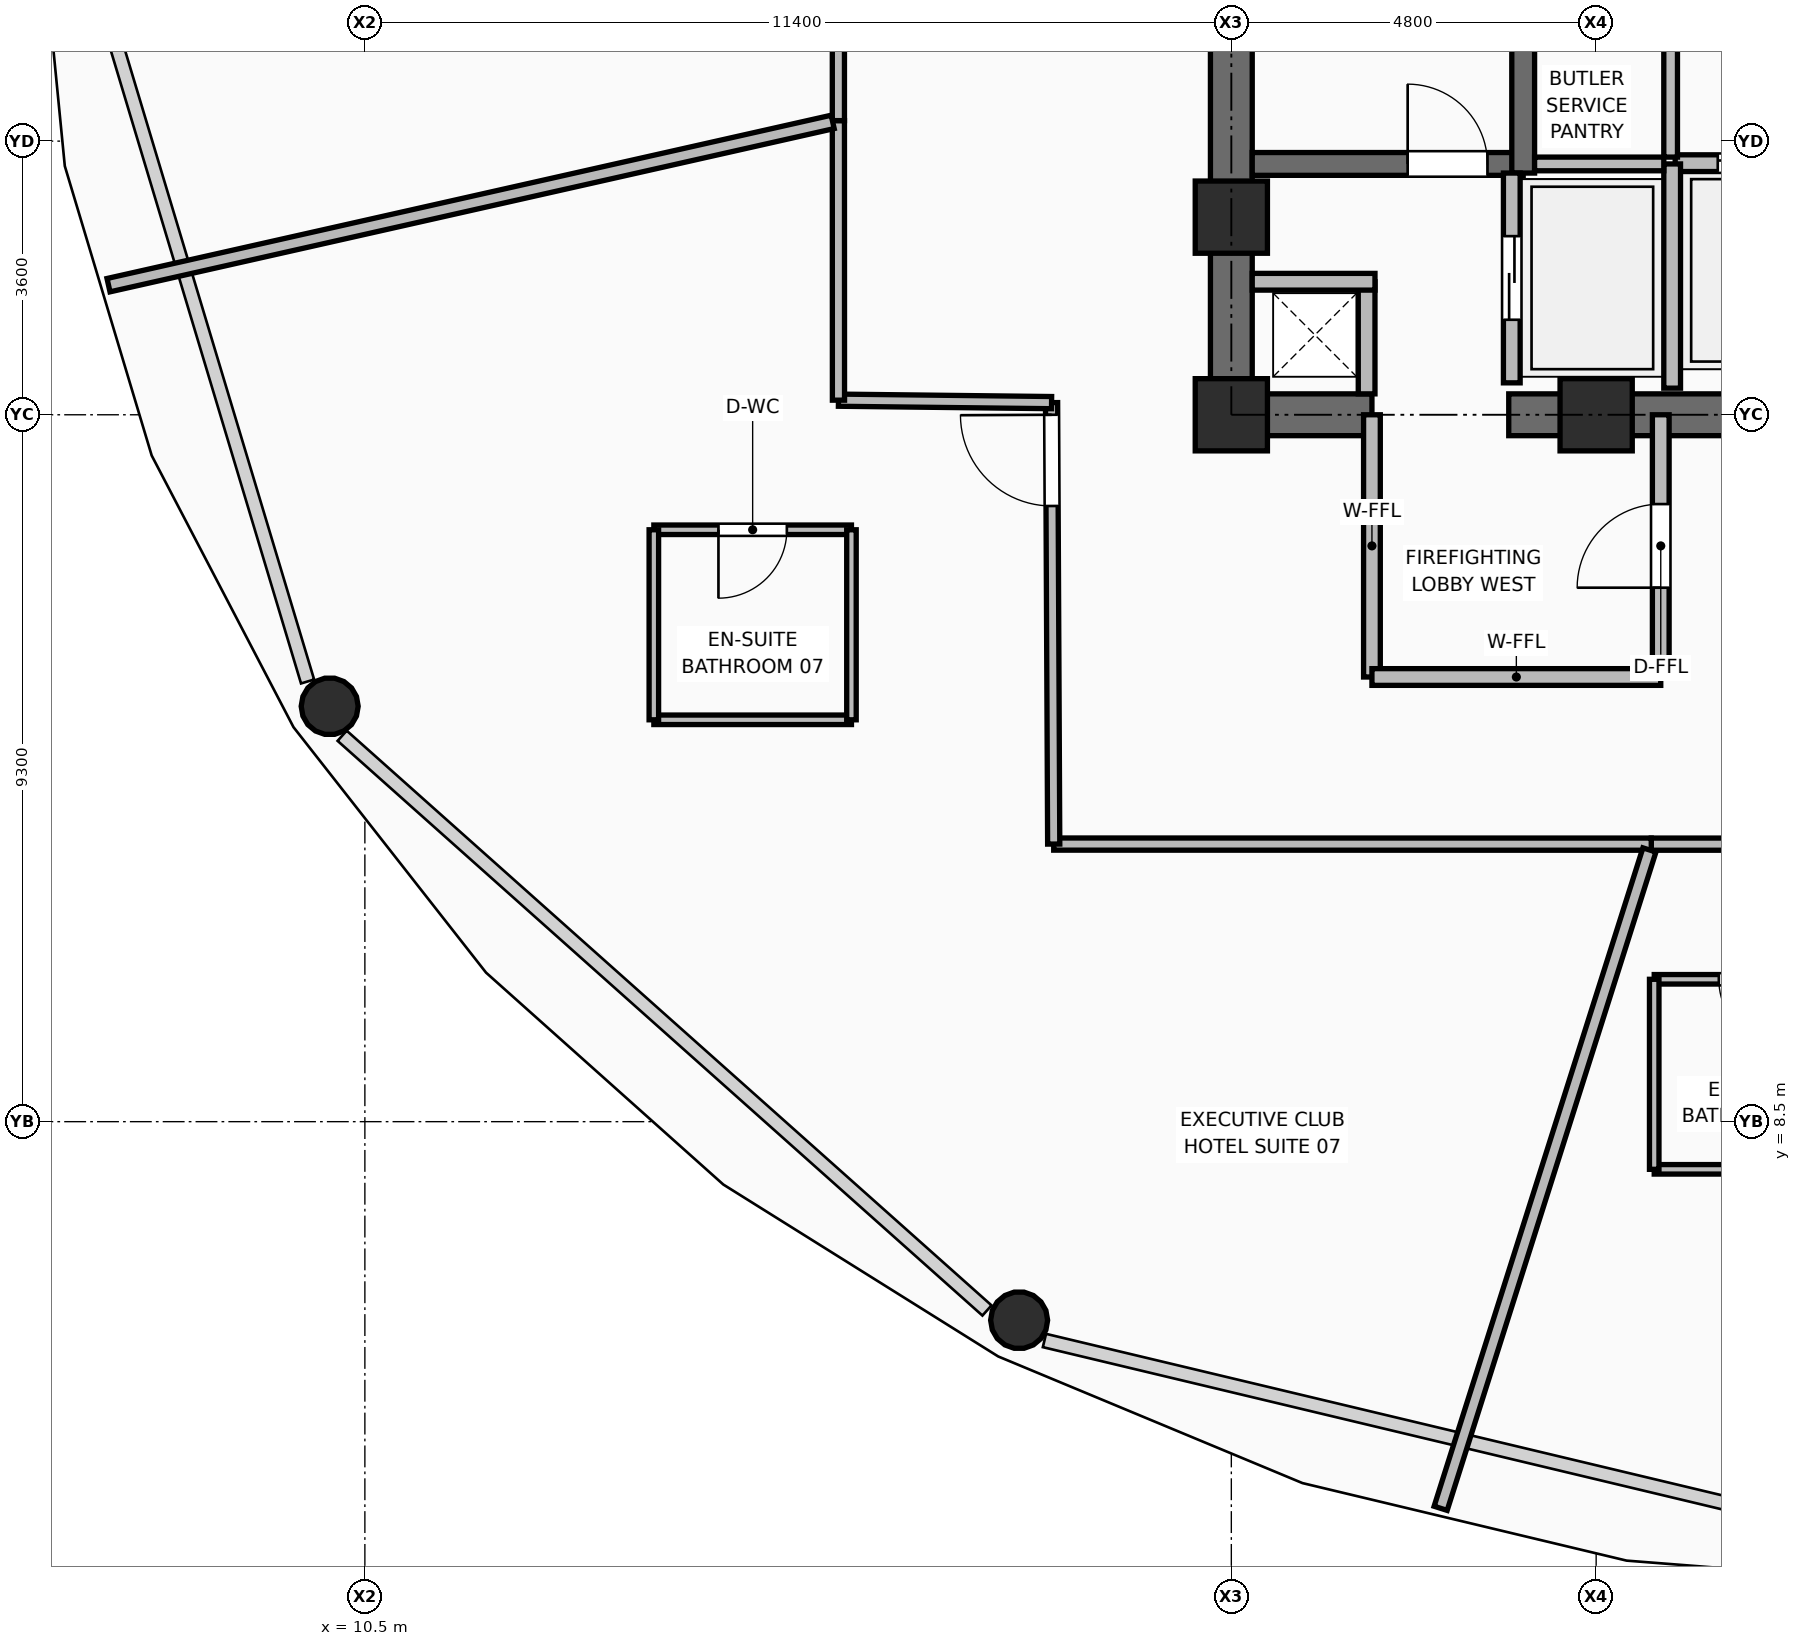
"""IFC4 building model, lengths in metres.
Left out: names, types, materials, properties, quantities, classifications, styles, units other than length and angle.
Written with IfcOpenShell. Run it as: python <this file> out.ifc"""

import sys

from ifc_helpers import new_model, si_unit, direction, frame, frame_2d, origin, origin_2d, place, context, subcontext, project, spatial, rectangle, hollow_circle, extrude, element, fill, save


model = new_model("IFC4")
c1 = context("Model", 3, precision=1e-05, world=origin(), true_north=direction((0.0, 1.0)))
c2 = subcontext(c1, "Body", "Model", "MODEL_VIEW")
j1 = project(units=[si_unit("LENGTHUNIT", "METRE"), si_unit("PLANEANGLEUNIT", "RADIAN")], contexts=[c1])
p1 = place(None, origin())
s1 = spatial("IfcSite", under=j1, at=p1, CompositionType="ELEMENT")
p2 = place(p1, origin())
s2 = spatial("IfcBuilding", under=s1, at=p2, CompositionType="ELEMENT")
p3 = place(p2, frame((0.0, 0.0, 160.95)))
s3 = spatial("IfcBuildingStorey", under=s2, at=p3, CompositionType="ELEMENT", Elevation=160.95)
for number, where, z_axis, x_axis in (
    (1, (21.9, 17.8, 0.0), (0.0, 0.0, 1.0), (1.0, 0.0, 0.0)),
    (2, (26.7, 17.8, 0.0), (0.0, 0.0, 1.0), (1.0, 0.0, 0.0)),
    (3, (21.9, 20.4, 0.0), (0.0, 0.0, 1.0), (1.0, 0.0, 0.0)),
):
    element("IfcColumn", number, at=place(p3, frame(where, z_axis=z_axis, x_axis=x_axis)), inside=s3, PredefinedType="COLUMN", context=c2, shape_type="SweptSolid", body=[
        extrude(rectangle(XDim=0.95, YDim=0.95, at=origin_2d()), origin(), (0.0, 0.0, 1.0), 3.75),
    ])
p4 = place(p3, frame((10.037, 13.965, 0.0), z_axis=(0.059769728806, 0.030976548947, 0.997731443292), x_axis=(-0.460139651685, 0.887846552591, 0.0)))
e4 = element("IfcColumn", 4, at=p4, inside=s3, PredefinedType="COLUMN", context=c2, shape_type="SweptSolid", body=[
    extrude(hollow_circle(Radius=0.375, WallThickness=0.035, at=origin_2d()), origin(), (0.0, 0.0, 1.0), 3.578),
])
p5 = place(p3, frame((19.108, 5.888, 0.0), z_axis=(0.034669243934, 0.053437043308, 0.997969200891), x_axis=(-0.838908401488, 0.544272628296, 0.0)))
e5 = element("IfcColumn", 5, at=p5, inside=s3, PredefinedType="COLUMN", context=c2, shape_type="SweptSolid", body=[
    extrude(hollow_circle(Radius=0.375, WallThickness=0.035, at=origin_2d()), origin(), (0.0, 0.0, 1.0), 3.577),
])
p6 = place(p3, frame((21.625, 17.8, 0.0), z_axis=(0.0, 0.0, 1.0), x_axis=(1.0, 0.0, 0.0)))
e6 = element("IfcWall", 6, at=p6, inside=s3, PredefinedType="SHEAR", context=c2, shape_type="SweptSolid", body=[
    extrude(rectangle(XDim=2.125, YDim=0.55, at=frame_2d((1.062, 0.0))), origin(), (0.0, 0.0, 1.0), 3.57),
])
p7 = place(p3, frame((25.55, 17.8, 0.0), z_axis=(0.0, 0.0, 1.0), x_axis=(1.0, 0.0, 0.0)))
e7 = element("IfcWall", 7, at=p7, inside=s3, PredefinedType="SHEAR", context=c2, shape_type="SweptSolid", body=[
    extrude(rectangle(XDim=6.9, YDim=0.55, at=frame_2d((3.45, 0.0))), origin(), (0.0, 0.0, 1.0), 3.57),
])
p8 = place(p3, frame((21.9, 18.075, 0.0), z_axis=(0.0, 0.0, 1.0), x_axis=(0.0, 1.0, 0.0)))
e8 = element("IfcWall", 8, at=p8, inside=s3, PredefinedType="SHEAR", context=c2, shape_type="SweptSolid", body=[
    extrude(rectangle(XDim=14.1, YDim=0.55, at=frame_2d((7.05, 0.0))), origin(), (0.0, 0.0, 1.0), 3.57),
])
p9 = place(p3, frame((22.175, 21.1, 0.0), z_axis=(0.0, 0.0, 1.0), x_axis=(1.0, 0.0, 0.0)))
e9 = element("IfcWall", 9, at=p9, inside=s3, PredefinedType="SHEAR", context=c2, shape_type="SweptSolid", body=[
    extrude(rectangle(XDim=3.565, YDim=0.3, at=frame_2d((1.782, 0.0))), origin(), (0.0, 0.0, 1.0), 3.57),
])
p10 = place(p9, frame((2.045, 0.0, 0.0)))
e10 = element("IfcOpeningElement", 10, at=p10, cuts=e9, PredefinedType="OPENING", context=c2, shape_type="SweptSolid", body=[
    extrude(rectangle(XDim=1.05, YDim=2.1, at=frame_2d((0.525, 1.05))), frame((0.0, 0.16, 0.0), z_axis=(0.0, -1.0, 0.0), x_axis=(1.0, 0.0, 0.0)), (0.0, 0.0, 1.0), 0.32),
])
p11 = place(p3, frame((25.74, 20.98, 0.0), z_axis=(0.0, 0.0, 1.0), x_axis=(0.0, 1.0, 0.0)))
e11 = element("IfcWall", 11, at=p11, inside=s3, PredefinedType="SHEAR", context=c2, shape_type="SweptSolid", body=[
    extrude(rectangle(XDim=7.99, YDim=0.3, at=frame_2d((3.995, 0.0))), origin(), (0.0, 0.0, 1.0), 3.57),
])
p12 = place(p3, frame((23.68, 18.075, 0.0), z_axis=(0.0, 0.0, 1.0), x_axis=(0.0, 1.0, 0.0)))
e12 = element("IfcWall", 12, at=p12, inside=s3, PredefinedType="PARTITIONING", context=c2, shape_type="SweptSolid", body=[
    extrude(rectangle(XDim=1.475, YDim=0.22, at=frame_2d((0.738, 0.0))), origin(), (0.0, 0.0, 1.0), 3.55),
])
p13 = place(p3, frame((22.175, 19.55, 0.0), z_axis=(0.0, 0.0, 1.0), x_axis=(1.0, 0.0, 0.0)))
e13 = element("IfcWall", 13, at=p13, inside=s3, PredefinedType="PARTITIONING", context=c2, shape_type="SweptSolid", body=[
    extrude(rectangle(XDim=1.615, YDim=0.22, at=frame_2d((0.808, 0.0))), origin(), (0.0, 0.0, 1.0), 2.595),
])
p14 = place(p3, frame((25.59, 18.22, 0.0), z_axis=(0.0, 0.0, 1.0), x_axis=(0.0, 1.0, 0.0)))
e14 = element("IfcWall", 14, at=p14, inside=s3, PredefinedType="PARTITIONING", context=c2, shape_type="SweptSolid", body=[
    extrude(rectangle(XDim=2.76, YDim=0.22, at=frame_2d((1.38, 0.0))), origin(), (0.0, 0.0, 1.0), 3.55),
])
p15 = place(p14, frame((0.83, 0.0, 0.0)))
e15 = element("IfcOpeningElement", 15, at=p15, cuts=e14, PredefinedType="OPENING", context=c2, shape_type="SweptSolid", body=[
    extrude(rectangle(XDim=1.1, YDim=2.2, at=frame_2d((0.55, 1.1))), frame((0.0, 0.12, 0.0), z_axis=(0.0, -1.0, 0.0), x_axis=(1.0, 0.0, 0.0)), (0.0, 0.0, 1.0), 0.24),
])
p16 = place(p3, frame((27.74, 21.11, 0.0), z_axis=(0.0, 0.0, 1.0), x_axis=(1.0, 0.0, 0.0)))
e16 = element("IfcWall", 16, at=p16, inside=s3, PredefinedType="PARTITIONING", context=c2, shape_type="SweptSolid", body=[
    extrude(rectangle(XDim=2.22, YDim=0.22, at=frame_2d((1.11, 0.0))), origin(), (0.0, 0.0, 1.0), 3.55),
])
p17 = place(p16, frame((0.56, 0.0, 0.0)))
e17 = element("IfcOpeningElement", 17, at=p17, cuts=e16, PredefinedType="OPENING", context=c2, shape_type="SweptSolid", body=[
    extrude(rectangle(XDim=1.1, YDim=2.2, at=frame_2d((0.55, 1.1))), frame((0.0, 0.12, 0.0), z_axis=(0.0, -1.0, 0.0), x_axis=(1.0, 0.0, 0.0)), (0.0, 0.0, 1.0), 0.24),
])
p18 = place(p3, frame((27.7, 18.15, 0.0), z_axis=(0.0, 0.0, 1.0), x_axis=(0.0, 1.0, 0.0)))
e18 = element("IfcWall", 18, at=p18, inside=s3, PredefinedType="PARTITIONING", context=c2, shape_type="SweptSolid", body=[
    extrude(rectangle(XDim=2.95, YDim=0.22, at=frame_2d((1.475, 0.0))), origin(), (0.0, 0.0, 1.0), 3.55),
])
p19 = place(p3, frame((25.89, 21.1, 0.0), z_axis=(0.0, 0.0, 1.0), x_axis=(1.0, 0.0, 0.0)))
e19 = element("IfcWall", 19, at=p19, inside=s3, PredefinedType="PARTITIONING", context=c2, shape_type="SweptSolid", body=[
    extrude(rectangle(XDim=1.7, YDim=0.18, at=frame_2d((0.85, 0.0))), origin(), (0.0, 0.0, 1.0), 3.55),
])
p20 = place(p3, frame((27.68, 21.19, 0.0), z_axis=(0.0, 0.0, 1.0), x_axis=(0.0, 1.0, 0.0)))
e20 = element("IfcWall", 20, at=p20, inside=s3, PredefinedType="PARTITIONING", context=c2, shape_type="SweptSolid", body=[
    extrude(rectangle(XDim=4.37, YDim=0.18, at=frame_2d((2.185, 0.0))), origin(), (0.0, 0.0, 1.0), 3.55),
])
p21 = place(p20, frame((1.735, 0.0, 0.0)))
e21 = element("IfcOpeningElement", 21, at=p21, cuts=e20, PredefinedType="OPENING", context=c2, shape_type="SweptSolid", body=[
    extrude(rectangle(XDim=0.9, YDim=2.1, at=frame_2d((0.45, 1.05))), frame((0.0, 0.1, 0.0), z_axis=(0.0, -1.0, 0.0), x_axis=(1.0, 0.0, 0.0)), (0.0, 0.0, 1.0), 0.2),
])
p22 = place(p3, frame((23.75, 14.35, 0.0), z_axis=(0.0, 0.0, 1.0), x_axis=(0.0, 1.0, 0.0)))
e22 = element("IfcWall", 22, at=p22, inside=s3, PredefinedType="PARTITIONING", context=c2, shape_type="SweptSolid", body=[
    extrude(rectangle(XDim=3.45, YDim=0.22, at=frame_2d((1.725, 0.0))), origin(), (0.0, 0.0, 1.0), 3.006),
])
p23 = place(p3, frame((23.75, 14.35, 0.0), z_axis=(0.0, 0.0, 1.0), x_axis=(1.0, 0.0, 0.0)))
e23 = element("IfcWall", 23, at=p23, inside=s3, PredefinedType="PARTITIONING", context=c2, shape_type="SweptSolid", body=[
    extrude(rectangle(XDim=3.8, YDim=0.22, at=frame_2d((1.9, 0.0))), origin(), (0.0, 0.0, 1.0), 3.55),
])
p24 = place(p3, frame((27.55, 14.35, 0.0), z_axis=(0.0, 0.0, 1.0), x_axis=(0.0, 1.0, 0.0)))
e24 = element("IfcWall", 24, at=p24, inside=s3, PredefinedType="PARTITIONING", context=c2, shape_type="SweptSolid", body=[
    extrude(rectangle(XDim=3.45, YDim=0.22, at=frame_2d((1.725, 0.0))), origin(), (0.0, 0.0, 1.0), 3.006),
])
p25 = place(p24, frame((1.175, 0.0, 0.0)))
e25 = element("IfcOpeningElement", 25, at=p25, cuts=e24, PredefinedType="OPENING", context=c2, shape_type="SweptSolid", body=[
    extrude(rectangle(XDim=1.1, YDim=2.1, at=frame_2d((0.55, 1.05))), frame((0.0, 0.12, 0.0), z_axis=(0.0, -1.0, 0.0), x_axis=(1.0, 0.0, 0.0)), (0.0, 0.0, 1.0), 0.24),
])
p26 = place(p3, frame((43.433, 12.151, 0.0), z_axis=(0.0, 0.0, 1.0), x_axis=(-1.0, 0.0, 0.0)))
e26 = element("IfcWall", 26, at=p26, inside=s3, PredefinedType="PARTITIONING", context=c2, shape_type="SweptSolid", body=[
    extrude(rectangle(XDim=16.008, YDim=0.16, at=frame_2d((8.004, 0.0))), origin(), (0.0, 0.0, 1.0), 3.006),
])
p27 = place(p26, frame((7.329, 0.0, 0.0)))
e27 = element("IfcOpeningElement", 27, at=p27, cuts=e26, PredefinedType="OPENING", context=c2, shape_type="SweptSolid", body=[
    extrude(rectangle(XDim=1.2, YDim=2.1, at=frame_2d((0.6, 1.05))), frame((0.0, 0.09, 0.0), z_axis=(0.0, -1.0, 0.0), x_axis=(1.0, 0.0, 0.0)), (0.0, 0.0, 1.0), 0.18),
])
p28 = place(p3, frame((27.425, 12.151, 0.0), z_axis=(0.0, 0.0, 1.0), x_axis=(-0.999999987946, 0.000155265036, 0.0)))
e28 = element("IfcWall", 28, at=p28, inside=s3, PredefinedType="PARTITIONING", context=c2, shape_type="SweptSolid", body=[
    extrude(rectangle(XDim=7.862, YDim=0.16, at=frame_2d((3.931, 0.0))), origin(), (0.0, 0.0, 1.0), 3.006),
])
p29 = place(p3, frame((19.563, 12.152, 0.0), z_axis=(0.0, 0.0, 1.0), x_axis=(-0.004834110568, 0.999988315619, 0.0)))
e29 = element("IfcWall", 29, at=p29, inside=s3, PredefinedType="PARTITIONING", context=c2, shape_type="SweptSolid", body=[
    extrude(rectangle(XDim=5.808, YDim=0.16, at=frame_2d((2.904, 0.0))), origin(), (0.0, 0.0, 1.0), 3.006),
])
p30 = place(p29, frame((4.448, 0.0, 0.0)))
e30 = element("IfcOpeningElement", 30, at=p30, cuts=e29, PredefinedType="OPENING", context=c2, shape_type="SweptSolid", body=[
    extrude(rectangle(XDim=1.2, YDim=2.1, at=frame_2d((0.6, 1.05))), frame((0.0, 0.09, 0.0), z_axis=(0.0, -1.0, 0.0), x_axis=(1.0, 0.0, 0.0)), (0.0, 0.0, 1.0), 0.18),
])
p31 = place(p3, frame((19.535, 17.96, 0.0), z_axis=(0.0, 0.0, 1.0), x_axis=(-0.999934955853, 0.011405440071, 0.0)))
e31 = element("IfcWall", 31, at=p31, inside=s3, PredefinedType="PARTITIONING", context=c2, shape_type="SweptSolid", body=[
    extrude(rectangle(XDim=2.804, YDim=0.16, at=frame_2d((1.402, 0.0))), origin(), (0.0, 0.0, 1.0), 3.55),
])
p32 = place(p3, frame((16.731, 17.992, 0.0), z_axis=(0.0, 0.0, 1.0), x_axis=(-0.000265516088, 0.999999964751, 0.0)))
e32 = element("IfcWall", 32, at=p32, inside=s3, PredefinedType="PARTITIONING", context=c2, shape_type="SweptSolid", body=[
    extrude(rectangle(XDim=3.678, YDim=0.16, at=frame_2d((1.839, 0.0))), origin(), (0.0, 0.0, 1.0), 3.55),
])
p33 = place(p3, frame((16.73, 21.67, 0.0), z_axis=(0.0, 0.0, 1.0), x_axis=(0.0, 1.0, 0.0)))
e33 = element("IfcWall", 33, at=p33, inside=s3, PredefinedType="PARTITIONING", context=c2, shape_type="SweptSolid", body=[
    extrude(rectangle(XDim=2.184, YDim=0.16, at=frame_2d((1.092, 0.0))), origin(), (0.0, 0.0, 1.0), 3.006),
])
p34 = place(p3, frame((16.655, 21.653, 0.0), z_axis=(0.0, 0.0, 1.0), x_axis=(-0.975513709094, -0.219938635466, 0.0)))
e34 = element("IfcWall", 34, at=p34, inside=s3, PredefinedType="PARTITIONING", context=c2, shape_type="SweptSolid", body=[
    extrude(rectangle(XDim=9.767, YDim=0.18, at=frame_2d((4.884, 0.0))), origin(), (0.0, 0.0, 1.0), 2.852),
])
p35 = place(p3, frame((27.401, 12.075, 0.0), z_axis=(0.0, 0.0, 1.0), x_axis=(-0.302281968235, -0.953218553995, 0.0)))
e35 = element("IfcWall", 35, at=p35, inside=s3, PredefinedType="PARTITIONING", context=c2, shape_type="SweptSolid", body=[
    extrude(rectangle(XDim=9.087, YDim=0.18, at=frame_2d((4.543, 0.0))), origin(), (0.0, 0.0, 1.0), 2.852),
])
p36 = place(p3, frame((14.302, 13.787, 0.0), z_axis=(0.0, 0.0, 1.0), x_axis=(1.0, 0.0, 0.0)))
e36 = element("IfcWall", 36, at=p36, inside=s3, PredefinedType="PARTITIONING", context=c2, shape_type="SweptSolid", body=[
    extrude(rectangle(XDim=2.6, YDim=0.125, at=frame_2d((1.3, 0.0))), origin(), (0.0, 0.0, 1.0), 3.55),
])
p37 = place(p3, frame((14.302, 16.287, 0.0), z_axis=(0.0, 0.0, 1.0), x_axis=(1.0, 0.0, 0.0)))
e37 = element("IfcWall", 37, at=p37, inside=s3, PredefinedType="PARTITIONING", context=c2, shape_type="SweptSolid", body=[
    extrude(rectangle(XDim=2.6, YDim=0.125, at=frame_2d((1.3, 0.0))), origin(), (0.0, 0.0, 1.0), 3.006),
])
p38 = place(p37, frame((0.85, 0.0, 0.0)))
e38 = element("IfcOpeningElement", 38, at=p38, cuts=e37, PredefinedType="OPENING", context=c2, shape_type="SweptSolid", body=[
    extrude(rectangle(XDim=0.9, YDim=2.1, at=frame_2d((0.45, 1.05))), frame((0.0, 0.073, 0.0), z_axis=(0.0, -1.0, 0.0), x_axis=(1.0, 0.0, 0.0)), (0.0, 0.0, 1.0), 0.145),
])
for number, where, z_axis, x_axis in (
    (39, (14.302, 13.787, 0.0), (0.0, 0.0, 1.0), (0.0, 1.0, 0.0)),
    (40, (16.902, 13.787, 0.0), (0.0, 0.0, 1.0), (0.0, 1.0, 0.0)),
):
    element("IfcWall", number, at=place(p3, frame(where, z_axis=z_axis, x_axis=x_axis)), inside=s3, PredefinedType="PARTITIONING", context=c2, shape_type="SweptSolid", body=[
        extrude(rectangle(XDim=2.5, YDim=0.125, at=frame_2d((1.25, 0.0))), origin(), (0.0, 0.0, 1.0), 3.006),
    ])
p39 = place(p3, frame((27.464, 7.873, 0.0), z_axis=(0.0, 0.0, 1.0), x_axis=(1.0, 0.0, 0.0)))
e41 = element("IfcWall", 41, at=p39, inside=s3, PredefinedType="PARTITIONING", context=c2, shape_type="SweptSolid", body=[
    extrude(rectangle(XDim=2.6, YDim=0.125, at=frame_2d((1.3, 0.0))), origin(), (0.0, 0.0, 1.0), 3.55),
])
p40 = place(p3, frame((27.464, 10.373, 0.0), z_axis=(0.0, 0.0, 1.0), x_axis=(1.0, 0.0, 0.0)))
e42 = element("IfcWall", 42, at=p40, inside=s3, PredefinedType="PARTITIONING", context=c2, shape_type="SweptSolid", body=[
    extrude(rectangle(XDim=2.6, YDim=0.125, at=frame_2d((1.3, 0.0))), origin(), (0.0, 0.0, 1.0), 3.55),
])
p41 = place(p40, frame((0.85, 0.0, 0.0)))
e43 = element("IfcOpeningElement", 43, at=p41, cuts=e42, PredefinedType="OPENING", context=c2, shape_type="SweptSolid", body=[
    extrude(rectangle(XDim=0.9, YDim=2.1, at=frame_2d((0.45, 1.05))), frame((0.0, 0.073, 0.0), z_axis=(0.0, -1.0, 0.0), x_axis=(1.0, 0.0, 0.0)), (0.0, 0.0, 1.0), 0.145),
])
p42 = place(p3, frame((27.464, 7.873, 0.0), z_axis=(0.0, 0.0, 1.0), x_axis=(0.0, 1.0, 0.0)))
e44 = element("IfcWall", 44, at=p42, inside=s3, PredefinedType="PARTITIONING", context=c2, shape_type="SweptSolid", body=[
    extrude(rectangle(XDim=2.5, YDim=0.125, at=frame_2d((1.25, 0.0))), origin(), (0.0, 0.0, 1.0), 3.55),
])
p43 = place(p10, origin())
e45 = element("IfcDoor", 45, at=p43, inside=s3, OperationType="SINGLE_SWING_LEFT", PredefinedType="DOOR", context=c2, shape_type="SweptSolid", body=[
    extrude(rectangle(XDim=1.05, YDim=2.1, at=frame_2d((0.525, 1.05))), frame((0.0, 0.025, 0.0), z_axis=(0.0, -1.0, 0.0), x_axis=(1.0, 0.0, 0.0)), (0.0, 0.0, 1.0), 0.05),
])
fill(e10, e45)
p44 = place(p15, origin())
e46 = element("IfcDoor", 46, at=p44, inside=s3, OperationType="DOUBLE_DOOR_SLIDING", PredefinedType="DOOR", context=c2, shape_type="SweptSolid", body=[
    extrude(rectangle(XDim=1.1, YDim=2.2, at=frame_2d((0.55, 1.1))), frame((0.0, 0.025, 0.0), z_axis=(0.0, -1.0, 0.0), x_axis=(1.0, 0.0, 0.0)), (0.0, 0.0, 1.0), 0.05),
])
fill(e15, e46)
p45 = place(p17, origin())
e47 = element("IfcDoor", 47, at=p45, inside=s3, OperationType="DOUBLE_DOOR_SLIDING", PredefinedType="DOOR", context=c2, shape_type="SweptSolid", body=[
    extrude(rectangle(XDim=1.1, YDim=2.2, at=frame_2d((0.55, 1.1))), frame((0.0, 0.025, 0.0), z_axis=(0.0, -1.0, 0.0), x_axis=(1.0, 0.0, 0.0)), (0.0, 0.0, 1.0), 0.05),
])
fill(e17, e47)
p46 = place(p25, origin())
e48 = element("IfcDoor", 48, at=p46, inside=s3, OperationType="SINGLE_SWING_LEFT", PredefinedType="DOOR", context=c2, shape_type="SweptSolid", body=[
    extrude(rectangle(XDim=1.1, YDim=2.1, at=frame_2d((0.55, 1.05))), frame((0.0, 0.025, 0.0), z_axis=(0.0, -1.0, 0.0), x_axis=(1.0, 0.0, 0.0)), (0.0, 0.0, 1.0), 0.05),
])
fill(e25, e48)
p47 = place(p38, frame((0.9, 0.0, 0.0), z_axis=(0.0, 0.0, 1.0), x_axis=(-1.0, 0.0, 0.0)))
e49 = element("IfcDoor", 49, at=p47, inside=s3, OperationType="SINGLE_SWING_RIGHT", PredefinedType="DOOR", context=c2, shape_type="SweptSolid", body=[
    extrude(rectangle(XDim=0.9, YDim=2.1, at=frame_2d((0.45, 1.05))), frame((0.0, 0.025, 0.0), z_axis=(0.0, -1.0, 0.0), x_axis=(1.0, 0.0, 0.0)), (0.0, 0.0, 1.0), 0.05),
])
fill(e38, e49)
p48 = place(p30, origin())
e50 = element("IfcDoor", 50, at=p48, inside=s3, OperationType="SINGLE_SWING_RIGHT", PredefinedType="DOOR", context=c2, shape_type="SweptSolid", body=[
    extrude(rectangle(XDim=1.2, YDim=2.1, at=frame_2d((0.6, 1.05))), frame((0.0, 0.025, 0.0), z_axis=(0.0, -1.0, 0.0), x_axis=(1.0, 0.0, 0.0)), (0.0, 0.0, 1.0), 0.05),
])
fill(e30, e50)
p49 = place(p41, frame((0.9, 0.0, 0.0), z_axis=(0.0, 0.0, 1.0), x_axis=(-1.0, 0.0, 0.0)))
e51 = element("IfcDoor", 51, at=p49, inside=s3, OperationType="SINGLE_SWING_LEFT", PredefinedType="DOOR", context=c2, shape_type="SweptSolid", body=[
    extrude(rectangle(XDim=0.9, YDim=2.1, at=frame_2d((0.45, 1.05))), frame((0.0, 0.025, 0.0), z_axis=(0.0, -1.0, 0.0), x_axis=(1.0, 0.0, 0.0)), (0.0, 0.0, 1.0), 0.05),
])
fill(e43, e51)
save(model, sys.argv[1])
